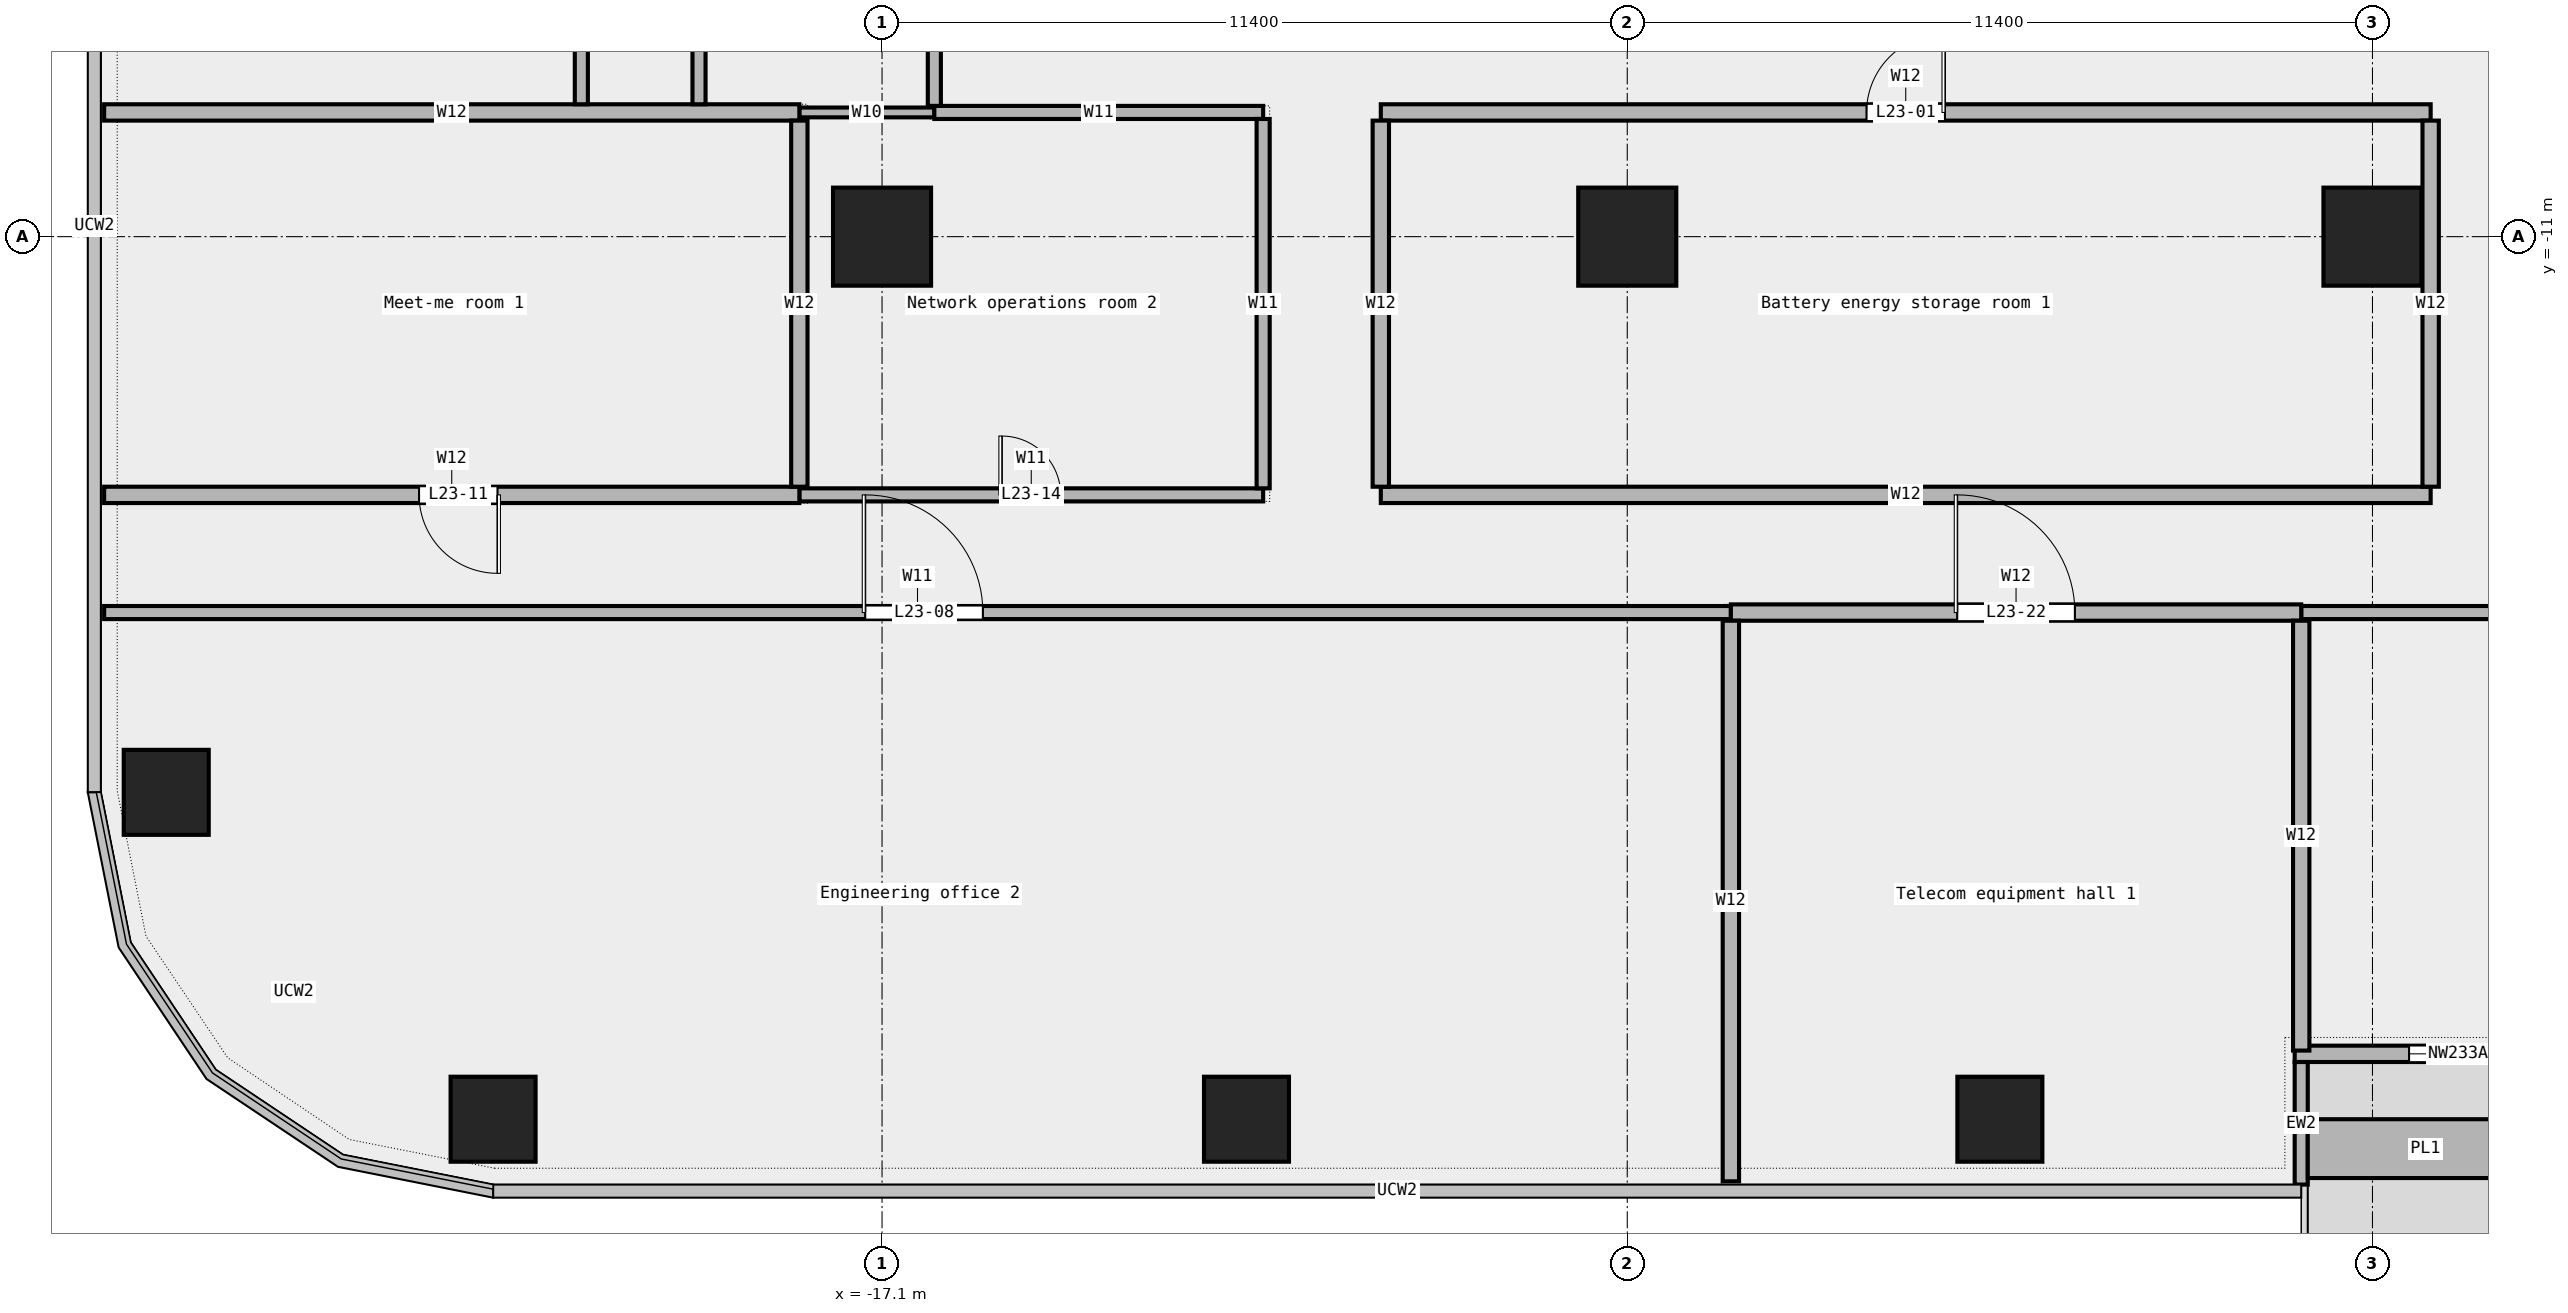
"""IFC4 building model, lengths in metres.
Left out: names, types, materials, properties, quantities, classifications, styles, units other than length and angle.
Written with IfcOpenShell. Run it as: python <this file> out.ifc"""

import sys

from ifc_helpers import new_model, si_unit, direction, frame, frame_2d, origin, origin_2d, place, context, subcontext, project, spatial, rectangle, extrude, element, fill, save


model = new_model("IFC4")
c1 = context("Model", 3, precision=1e-05, world=origin(), true_north=direction((0.0, 1.0)))
c2 = subcontext(c1, "Body", "Model", "MODEL_VIEW")
j1 = project(units=[si_unit("LENGTHUNIT", "METRE"), si_unit("PLANEANGLEUNIT", "RADIAN")], contexts=[c1])
p1 = place(None, origin())
s1 = spatial("IfcSite", under=j1, at=p1, CompositionType="ELEMENT")
p2 = place(p1, origin())
s2 = spatial("IfcBuilding", under=s1, at=p2, CompositionType="ELEMENT")
p3 = place(p2, frame((0.0, 0.0, 117.1)))
s3 = spatial("IfcBuildingStorey", under=s2, at=p3, CompositionType="ELEMENT", Elevation=117.1)
for number, where, z_axis, x_axis in (
    (1, (-23.05, -24.5, 0.0), (0.0, 0.0, 1.0), (1.0, 0.0, 0.0)),
    (2, (-11.525, -24.5, 0.0), (0.0, 0.0, 1.0), (1.0, 0.0, 0.0)),
    (3, (0.0, -24.5, 0.0), (0.0, 0.0, 1.0), (1.0, 0.0, 0.0)),
    (4, (-28.05, -19.5, 0.0), (0.0, 0.0, 1.0), (1.0, 0.0, 0.0)),
):
    element("IfcColumn", number, at=place(p3, frame(where, z_axis=z_axis, x_axis=x_axis)), inside=s3, PredefinedType="COLUMN", context=c2, shape_type="SweptSolid", body=[
        extrude(rectangle(XDim=1.3, YDim=1.3, at=origin_2d()), origin(), (0.0, 0.0, 1.0), 4.05),
    ])
for number, where, z_axis, x_axis in (
    (5, (-17.1, -11.0, 0.0), (0.0, 0.0, 1.0), (1.0, 0.0, 0.0)),
    (6, (-5.7, -11.0, 0.0), (0.0, 0.0, 1.0), (1.0, 0.0, 0.0)),
    (7, (5.7, -11.0, 0.0), (0.0, 0.0, 1.0), (1.0, 0.0, 0.0)),
):
    element("IfcColumn", number, at=place(p3, frame(where, z_axis=z_axis, x_axis=x_axis)), inside=s3, PredefinedType="COLUMN", context=c2, shape_type="SweptSolid", body=[
        extrude(rectangle(XDim=1.5, YDim=1.5, at=origin_2d()), origin(), (0.0, 0.0, 1.0), 4.05),
    ])
p4 = place(p3, frame((4.51, -23.5, 0.0), z_axis=(0.0, 0.0, 1.0), x_axis=(1.0, 0.0, 0.0)))
e8 = element("IfcWall", 8, at=p4, inside=s3, PredefinedType="STANDARD", context=c2, shape_type="SweptSolid", body=[
    extrude(rectangle(XDim=14.03, YDim=0.25, at=frame_2d((7.015, 0.0))), origin(), (0.0, 0.0, 1.0), 4.05),
])
p5 = place(p4, frame((1.75, 0.0, 0.45)))
e9 = element("IfcOpeningElement", 9, at=p5, cuts=e8, PredefinedType="OPENING", context=c2, shape_type="SweptSolid", body=[
    extrude(rectangle(XDim=1.5, YDim=3.0, at=frame_2d((0.75, 1.5))), frame((0.0, 0.137, 0.0), z_axis=(0.0, -1.0, 0.0), x_axis=(1.0, 0.0, 0.0)), (0.0, 0.0, 1.0), 0.274),
])
p6 = place(p4, frame((4.25, 0.0, 0.0)))
e10 = element("IfcOpeningElement", 10, at=p6, cuts=e8, PredefinedType="OPENING", context=c2, shape_type="SweptSolid", body=[
    extrude(rectangle(XDim=1.8, YDim=2.4, at=frame_2d((0.9, 1.2))), frame((0.0, 0.137, 0.0), z_axis=(0.0, -1.0, 0.0), x_axis=(1.0, 0.0, 0.0)), (0.0, 0.0, 1.0), 0.274),
])
p7 = place(p4, frame((10.75, 0.0, 0.45)))
e11 = element("IfcOpeningElement", 11, at=p7, cuts=e8, PredefinedType="OPENING", context=c2, shape_type="SweptSolid", body=[
    extrude(rectangle(XDim=1.5, YDim=3.0, at=frame_2d((0.75, 1.5))), frame((0.0, 0.137, 0.0), z_axis=(0.0, -1.0, 0.0), x_axis=(1.0, 0.0, 0.0)), (0.0, 0.0, 1.0), 0.274),
])
p8 = place(p3, frame((4.61, -25.5, 0.0), z_axis=(0.0, 0.0, 1.0), x_axis=(0.0, 1.0, 0.0)))
e12 = element("IfcWall", 12, at=p8, inside=s3, PredefinedType="STANDARD", context=c2, shape_type="SweptSolid", body=[
    extrude(rectangle(XDim=1.875, YDim=0.2, at=frame_2d((0.938, 0.0))), origin(), (0.0, 0.0, 1.0), 4.05),
])
p9 = place(p3, frame((4.71, -24.95, 0.0), z_axis=(0.0, 0.0, 1.0), x_axis=(1.0, 0.0, 0.0)))
e13 = element("IfcWall", 13, at=p9, inside=s3, PredefinedType="STANDARD", context=c2, shape_type="SweptSolid", body=[
    extrude(rectangle(XDim=3.6, YDim=0.9, at=frame_2d((1.8, 0.0))), origin(), (0.0, 0.0, 1.0), 0.7),
])
p10 = place(p3, frame((-29.0, -16.75, 0.0), z_axis=(0.0, 0.0, 1.0), x_axis=(1.0, 0.0, 0.0)))
e14 = element("IfcWall", 14, at=p10, inside=s3, PredefinedType="PARTITIONING", context=c2, shape_type="SweptSolid", body=[
    extrude(rectangle(XDim=24.885, YDim=0.2, at=frame_2d((12.442, 0.0))), origin(), (0.0, 0.0, 1.0), 4.05),
])
p11 = place(p10, frame((11.643, 0.0, 0.0)))
e15 = element("IfcOpeningElement", 15, at=p11, cuts=e14, PredefinedType="OPENING", context=c2, shape_type="SweptSolid", body=[
    extrude(rectangle(XDim=1.8, YDim=2.1, at=frame_2d((0.9, 1.05))), frame((0.0, 0.112, 0.0), z_axis=(0.0, -1.0, 0.0), x_axis=(1.0, 0.0, 0.0)), (0.0, 0.0, 1.0), 0.224),
])
p12 = place(p3, frame((4.61, -16.75, 0.0), z_axis=(0.0, 0.0, 1.0), x_axis=(1.0, 0.0, 0.0)))
e16 = element("IfcWall", 16, at=p12, inside=s3, PredefinedType="PARTITIONING", context=c2, shape_type="SweptSolid", body=[
    extrude(rectangle(XDim=24.39, YDim=0.2, at=frame_2d((12.195, 0.0))), origin(), (0.0, 0.0, 1.0), 4.05),
])
p13 = place(p12, frame((18.41, 0.0, 0.0)))
e17 = element("IfcOpeningElement", 17, at=p13, cuts=e16, PredefinedType="OPENING", context=c2, shape_type="SweptSolid", body=[
    extrude(rectangle(XDim=1.2, YDim=2.1, at=frame_2d((0.6, 1.05))), frame((0.0, 0.112, 0.0), z_axis=(0.0, -1.0, 0.0), x_axis=(1.0, 0.0, 0.0)), (0.0, 0.0, 1.0), 0.224),
])
p14 = place(p12, frame((6.315, 0.0, 0.0)))
e18 = element("IfcOpeningElement", 18, at=p14, cuts=e16, PredefinedType="OPENING", context=c2, shape_type="SweptSolid", body=[
    extrude(rectangle(XDim=1.2, YDim=2.1, at=frame_2d((0.6, 1.05))), frame((0.0, 0.112, 0.0), z_axis=(0.0, -1.0, 0.0), x_axis=(1.0, 0.0, 0.0)), (0.0, 0.0, 1.0), 0.224),
])
p15 = place(p3, frame((-4.115, -16.75, 0.0), z_axis=(0.0, 0.0, 1.0), x_axis=(1.0, 0.0, 0.0)))
e19 = element("IfcWall", 19, at=p15, inside=s3, PredefinedType="PARTITIONING", context=c2, shape_type="SweptSolid", body=[
    extrude(rectangle(XDim=8.725, YDim=0.25, at=frame_2d((4.363, 0.0))), origin(), (0.0, 0.0, 1.0), 4.05),
])
p16 = place(p15, frame((3.462, 0.0, 0.0)))
e20 = element("IfcOpeningElement", 20, at=p16, cuts=e19, PredefinedType="OPENING", context=c2, shape_type="SweptSolid", body=[
    extrude(rectangle(XDim=1.8, YDim=2.1, at=frame_2d((0.9, 1.05))), frame((0.0, 0.137, 0.0), z_axis=(0.0, -1.0, 0.0), x_axis=(1.0, 0.0, 0.0)), (0.0, 0.0, 1.0), 0.274),
])
p17 = place(p3, frame((-18.365, -14.95, 0.0), z_axis=(0.0, 0.0, 1.0), x_axis=(1.0, 0.0, 0.0)))
e21 = element("IfcWall", 21, at=p17, inside=s3, PredefinedType="PARTITIONING", context=c2, shape_type="SweptSolid", body=[
    extrude(rectangle(XDim=7.095, YDim=0.2, at=frame_2d((3.547, 0.0))), origin(), (0.0, 0.0, 1.0), 4.05),
])
p18 = place(p17, frame((3.097, 0.0, 0.0)))
e22 = element("IfcOpeningElement", 22, at=p18, cuts=e21, PredefinedType="OPENING", context=c2, shape_type="SweptSolid", body=[
    extrude(rectangle(XDim=0.9, YDim=2.1, at=frame_2d((0.45, 1.05))), frame((0.0, 0.112, 0.0), z_axis=(0.0, -1.0, 0.0), x_axis=(1.0, 0.0, 0.0)), (0.0, 0.0, 1.0), 0.224),
])
p19 = place(p3, frame((-29.0, -14.95, 0.0), z_axis=(0.0, 0.0, 1.0), x_axis=(1.0, 0.0, 0.0)))
e23 = element("IfcWall", 23, at=p19, inside=s3, PredefinedType="PARTITIONING", context=c2, shape_type="SweptSolid", body=[
    extrude(rectangle(XDim=10.635, YDim=0.25, at=frame_2d((5.317, 0.0))), origin(), (0.0, 0.0, 1.0), 4.05),
])
p20 = place(p19, frame((4.817, 0.0, 0.0)))
e24 = element("IfcOpeningElement", 24, at=p20, cuts=e23, PredefinedType="OPENING", context=c2, shape_type="SweptSolid", body=[
    extrude(rectangle(XDim=1.2, YDim=2.1, at=frame_2d((0.6, 1.05))), frame((0.0, 0.137, 0.0), z_axis=(0.0, -1.0, 0.0), x_axis=(1.0, 0.0, 0.0)), (0.0, 0.0, 1.0), 0.274),
])
p21 = place(p3, frame((-9.47, -14.95, 0.0), z_axis=(0.0, 0.0, 1.0), x_axis=(1.0, 0.0, 0.0)))
e25 = element("IfcWall", 25, at=p21, inside=s3, PredefinedType="PARTITIONING", context=c2, shape_type="SweptSolid", body=[
    extrude(rectangle(XDim=16.06, YDim=0.25, at=frame_2d((8.03, 0.0))), origin(), (0.0, 0.0, 1.0), 4.05),
])
p22 = place(p3, frame((-18.365, -9.1, 0.0), z_axis=(0.0, 0.0, 1.0), x_axis=(1.0, 0.0, 0.0)))
e26 = element("IfcWall", 26, at=p22, inside=s3, PredefinedType="PARTITIONING", context=c2, shape_type="SweptSolid", body=[
    extrude(rectangle(XDim=2.065, YDim=0.15, at=frame_2d((1.032, 0.0))), origin(), (0.0, 0.0, 1.0), 4.05),
])
p23 = place(p3, frame((-16.3, -9.1, 0.0), z_axis=(0.0, 0.0, 1.0), x_axis=(1.0, 0.0, 0.0)))
e27 = element("IfcWall", 27, at=p23, inside=s3, PredefinedType="PARTITIONING", context=c2, shape_type="SweptSolid", body=[
    extrude(rectangle(XDim=5.03, YDim=0.2, at=frame_2d((2.515, 0.0))), origin(), (0.0, 0.0, 1.0), 4.05),
])
p24 = place(p3, frame((-29.0, -9.1, 0.0), z_axis=(0.0, 0.0, 1.0), x_axis=(1.0, 0.0, 0.0)))
e28 = element("IfcWall", 28, at=p24, inside=s3, PredefinedType="PARTITIONING", context=c2, shape_type="SweptSolid", body=[
    extrude(rectangle(XDim=10.635, YDim=0.25, at=frame_2d((5.317, 0.0))), origin(), (0.0, 0.0, 1.0), 4.05),
])
p25 = place(p3, frame((-9.47, -9.1, 0.0), z_axis=(0.0, 0.0, 1.0), x_axis=(1.0, 0.0, 0.0)))
e29 = element("IfcWall", 29, at=p25, inside=s3, PredefinedType="PARTITIONING", context=c2, shape_type="SweptSolid", body=[
    extrude(rectangle(XDim=16.06, YDim=0.25, at=frame_2d((8.03, 0.0))), origin(), (0.0, 0.0, 1.0), 4.05),
])
p26 = place(p25, frame((7.43, 0.0, 0.0)))
e30 = element("IfcOpeningElement", 30, at=p26, cuts=e29, PredefinedType="OPENING", context=c2, shape_type="SweptSolid", body=[
    extrude(rectangle(XDim=1.2, YDim=2.1, at=frame_2d((0.6, 1.05))), frame((0.0, 0.137, 0.0), z_axis=(0.0, -1.0, 0.0), x_axis=(1.0, 0.0, 0.0)), (0.0, 0.0, 1.0), 0.274),
])
p27 = place(p3, frame((-21.7, -8.975, 0.0), z_axis=(0.0, 0.0, 1.0), x_axis=(0.0, 1.0, 0.0)))
e31 = element("IfcWall", 31, at=p27, inside=s3, PredefinedType="PARTITIONING", context=c2, shape_type="SweptSolid", body=[
    extrude(rectangle(XDim=24.25, YDim=0.2, at=frame_2d((12.125, 0.0))), origin(), (0.0, 0.0, 1.0), 4.05),
])
p28 = place(p27, frame((2.805, 0.0, 0.0)))
e32 = element("IfcOpeningElement", 32, at=p28, cuts=e31, PredefinedType="OPENING", context=c2, shape_type="SweptSolid", body=[
    extrude(rectangle(XDim=1.2, YDim=2.1, at=frame_2d((0.6, 1.05))), frame((0.0, 0.112, 0.0), z_axis=(0.0, -1.0, 0.0), x_axis=(1.0, 0.0, 0.0)), (0.0, 0.0, 1.0), 0.224),
])
p29 = place(p27, frame((21.58, 0.0, 0.0)))
e33 = element("IfcOpeningElement", 33, at=p29, cuts=e31, PredefinedType="OPENING", context=c2, shape_type="SweptSolid", body=[
    extrude(rectangle(XDim=0.9, YDim=2.1, at=frame_2d((0.45, 1.05))), frame((0.0, 0.112, 0.0), z_axis=(0.0, -1.0, 0.0), x_axis=(1.0, 0.0, 0.0)), (0.0, 0.0, 1.0), 0.224),
])
p30 = place(p27, frame((12.71, 0.0, 0.0)))
e34 = element("IfcOpeningElement", 34, at=p30, cuts=e31, PredefinedType="OPENING", context=c2, shape_type="SweptSolid", body=[
    extrude(rectangle(XDim=1.2, YDim=2.1, at=frame_2d((0.6, 1.05))), frame((0.0, 0.112, 0.0), z_axis=(0.0, -1.0, 0.0), x_axis=(1.0, 0.0, 0.0)), (0.0, 0.0, 1.0), 0.224),
])
p31 = place(p3, frame((-19.9, -8.975, 0.0), z_axis=(0.0, 0.0, 1.0), x_axis=(0.0, 1.0, 0.0)))
e35 = element("IfcWall", 35, at=p31, inside=s3, PredefinedType="PARTITIONING", context=c2, shape_type="SweptSolid", body=[
    extrude(rectangle(XDim=6.06, YDim=0.2, at=frame_2d((3.03, 0.0))), origin(), (0.0, 0.0, 1.0), 4.05),
])
p32 = place(p3, frame((-18.365, -14.825, 0.0), z_axis=(0.0, 0.0, 1.0), x_axis=(0.0, 1.0, 0.0)))
e36 = element("IfcWall", 36, at=p32, inside=s3, PredefinedType="PARTITIONING", context=c2, shape_type="SweptSolid", body=[
    extrude(rectangle(XDim=5.6, YDim=0.25, at=frame_2d((2.8, 0.0))), origin(), (0.0, 0.0, 1.0), 4.05),
])
p33 = place(p3, frame((-16.3, -9.0, 0.0), z_axis=(0.0, 0.0, 1.0), x_axis=(0.0, 1.0, 0.0)))
e37 = element("IfcWall", 37, at=p33, inside=s3, PredefinedType="PARTITIONING", context=c2, shape_type="SweptSolid", body=[
    extrude(rectangle(XDim=6.085, YDim=0.2, at=frame_2d((3.042, 0.0))), origin(), (0.0, 0.0, 1.0), 4.05),
])
p34 = place(p33, frame((2.593, 0.0, 0.0)))
e38 = element("IfcOpeningElement", 38, at=p34, cuts=e37, PredefinedType="OPENING", context=c2, shape_type="SweptSolid", body=[
    extrude(rectangle(XDim=0.9, YDim=2.1, at=frame_2d((0.45, 1.05))), frame((0.0, 0.112, 0.0), z_axis=(0.0, -1.0, 0.0), x_axis=(1.0, 0.0, 0.0)), (0.0, 0.0, 1.0), 0.224),
])
p35 = place(p3, frame((-11.27, -14.85, 0.0), z_axis=(0.0, 0.0, 1.0), x_axis=(0.0, 1.0, 0.0)))
e39 = element("IfcWall", 39, at=p35, inside=s3, PredefinedType="PARTITIONING", context=c2, shape_type="SweptSolid", body=[
    extrude(rectangle(XDim=5.65, YDim=0.2, at=frame_2d((2.825, 0.0))), origin(), (0.0, 0.0, 1.0), 4.05),
])
p36 = place(p3, frame((-9.47, -14.825, 0.0), z_axis=(0.0, 0.0, 1.0), x_axis=(0.0, 1.0, 0.0)))
e40 = element("IfcWall", 40, at=p36, inside=s3, PredefinedType="PARTITIONING", context=c2, shape_type="SweptSolid", body=[
    extrude(rectangle(XDim=5.6, YDim=0.25, at=frame_2d((2.8, 0.0))), origin(), (0.0, 0.0, 1.0), 4.05),
])
p37 = place(p3, frame((-4.115, -25.45, 0.0), z_axis=(0.0, 0.0, 1.0), x_axis=(0.0, 1.0, 0.0)))
e41 = element("IfcWall", 41, at=p37, inside=s3, PredefinedType="PARTITIONING", context=c2, shape_type="SweptSolid", body=[
    extrude(rectangle(XDim=8.575, YDim=0.25, at=frame_2d((4.288, 0.0))), origin(), (0.0, 0.0, 1.0), 4.05),
])
p38 = place(p3, frame((4.61, -23.45, 0.0), z_axis=(0.0, 0.0, 1.0), x_axis=(0.0, 1.0, 0.0)))
e42 = element("IfcWall", 42, at=p38, inside=s3, PredefinedType="PARTITIONING", context=c2, shape_type="SweptSolid", body=[
    extrude(rectangle(XDim=6.575, YDim=0.25, at=frame_2d((3.288, 0.0))), origin(), (0.0, 0.0, 1.0), 4.05),
])
p39 = place(p3, frame((6.59, -14.825, 0.0), z_axis=(0.0, 0.0, 1.0), x_axis=(0.0, 1.0, 0.0)))
e43 = element("IfcWall", 43, at=p39, inside=s3, PredefinedType="PARTITIONING", context=c2, shape_type="SweptSolid", body=[
    extrude(rectangle(XDim=5.6, YDim=0.25, at=frame_2d((2.8, 0.0))), origin(), (0.0, 0.0, 1.0), 4.05),
])
p40 = place(p5, origin())
e44 = element("IfcWindow", 44, at=p40, inside=s3, PartitioningType="SINGLE_PANEL", PredefinedType="WINDOW", context=c2, shape_type="SweptSolid", body=[
    extrude(rectangle(XDim=1.5, YDim=3.0, at=frame_2d((0.75, 1.5))), frame((0.0, 0.03, 0.0), z_axis=(0.0, -1.0, 0.0), x_axis=(1.0, 0.0, 0.0)), (0.0, 0.0, 1.0), 0.06),
])
fill(e9, e44)
p41 = place(p26, origin())
e45 = element("IfcDoor", 45, at=p41, inside=s3, OperationType="SINGLE_SWING_RIGHT", PredefinedType="DOOR", context=c2, shape_type="SweptSolid", body=[
    extrude(rectangle(XDim=1.2, YDim=2.1, at=frame_2d((0.6, 1.05))), frame((0.0, 0.025, 0.0), z_axis=(0.0, -1.0, 0.0), x_axis=(1.0, 0.0, 0.0)), (0.0, 0.0, 1.0), 0.05),
])
fill(e30, e45)
p42 = place(p11, origin())
e46 = element("IfcDoor", 46, at=p42, inside=s3, OperationType="DOUBLE_DOOR_SINGLE_SWING", PredefinedType="DOOR", context=c2, shape_type="SweptSolid", body=[
    extrude(rectangle(XDim=1.8, YDim=2.1, at=frame_2d((0.9, 1.05))), frame((0.0, 0.025, 0.0), z_axis=(0.0, -1.0, 0.0), x_axis=(1.0, 0.0, 0.0)), (0.0, 0.0, 1.0), 0.05),
])
fill(e15, e46)
p43 = place(p20, origin())
e47 = element("IfcDoor", 47, at=p43, inside=s3, OperationType="SINGLE_SWING_LEFT", PredefinedType="DOOR", context=c2, shape_type="SweptSolid", body=[
    extrude(rectangle(XDim=1.2, YDim=2.1, at=frame_2d((0.6, 1.05))), frame((0.0, 0.025, 0.0), z_axis=(0.0, -1.0, 0.0), x_axis=(1.0, 0.0, 0.0)), (0.0, 0.0, 1.0), 0.05),
])
fill(e24, e47)
p44 = place(p18, origin())
e48 = element("IfcDoor", 48, at=p44, inside=s3, OperationType="SINGLE_SWING_LEFT", PredefinedType="DOOR", context=c2, shape_type="SweptSolid", body=[
    extrude(rectangle(XDim=0.9, YDim=2.1, at=frame_2d((0.45, 1.05))), frame((0.0, 0.025, 0.0), z_axis=(0.0, -1.0, 0.0), x_axis=(1.0, 0.0, 0.0)), (0.0, 0.0, 1.0), 0.05),
])
fill(e22, e48)
p45 = place(p16, origin())
e49 = element("IfcDoor", 49, at=p45, inside=s3, OperationType="DOUBLE_DOOR_SINGLE_SWING", PredefinedType="DOOR", context=c2, shape_type="SweptSolid", body=[
    extrude(rectangle(XDim=1.8, YDim=2.1, at=frame_2d((0.9, 1.05))), frame((0.0, 0.025, 0.0), z_axis=(0.0, -1.0, 0.0), x_axis=(1.0, 0.0, 0.0)), (0.0, 0.0, 1.0), 0.05),
])
fill(e20, e49)
save(model, sys.argv[1])
